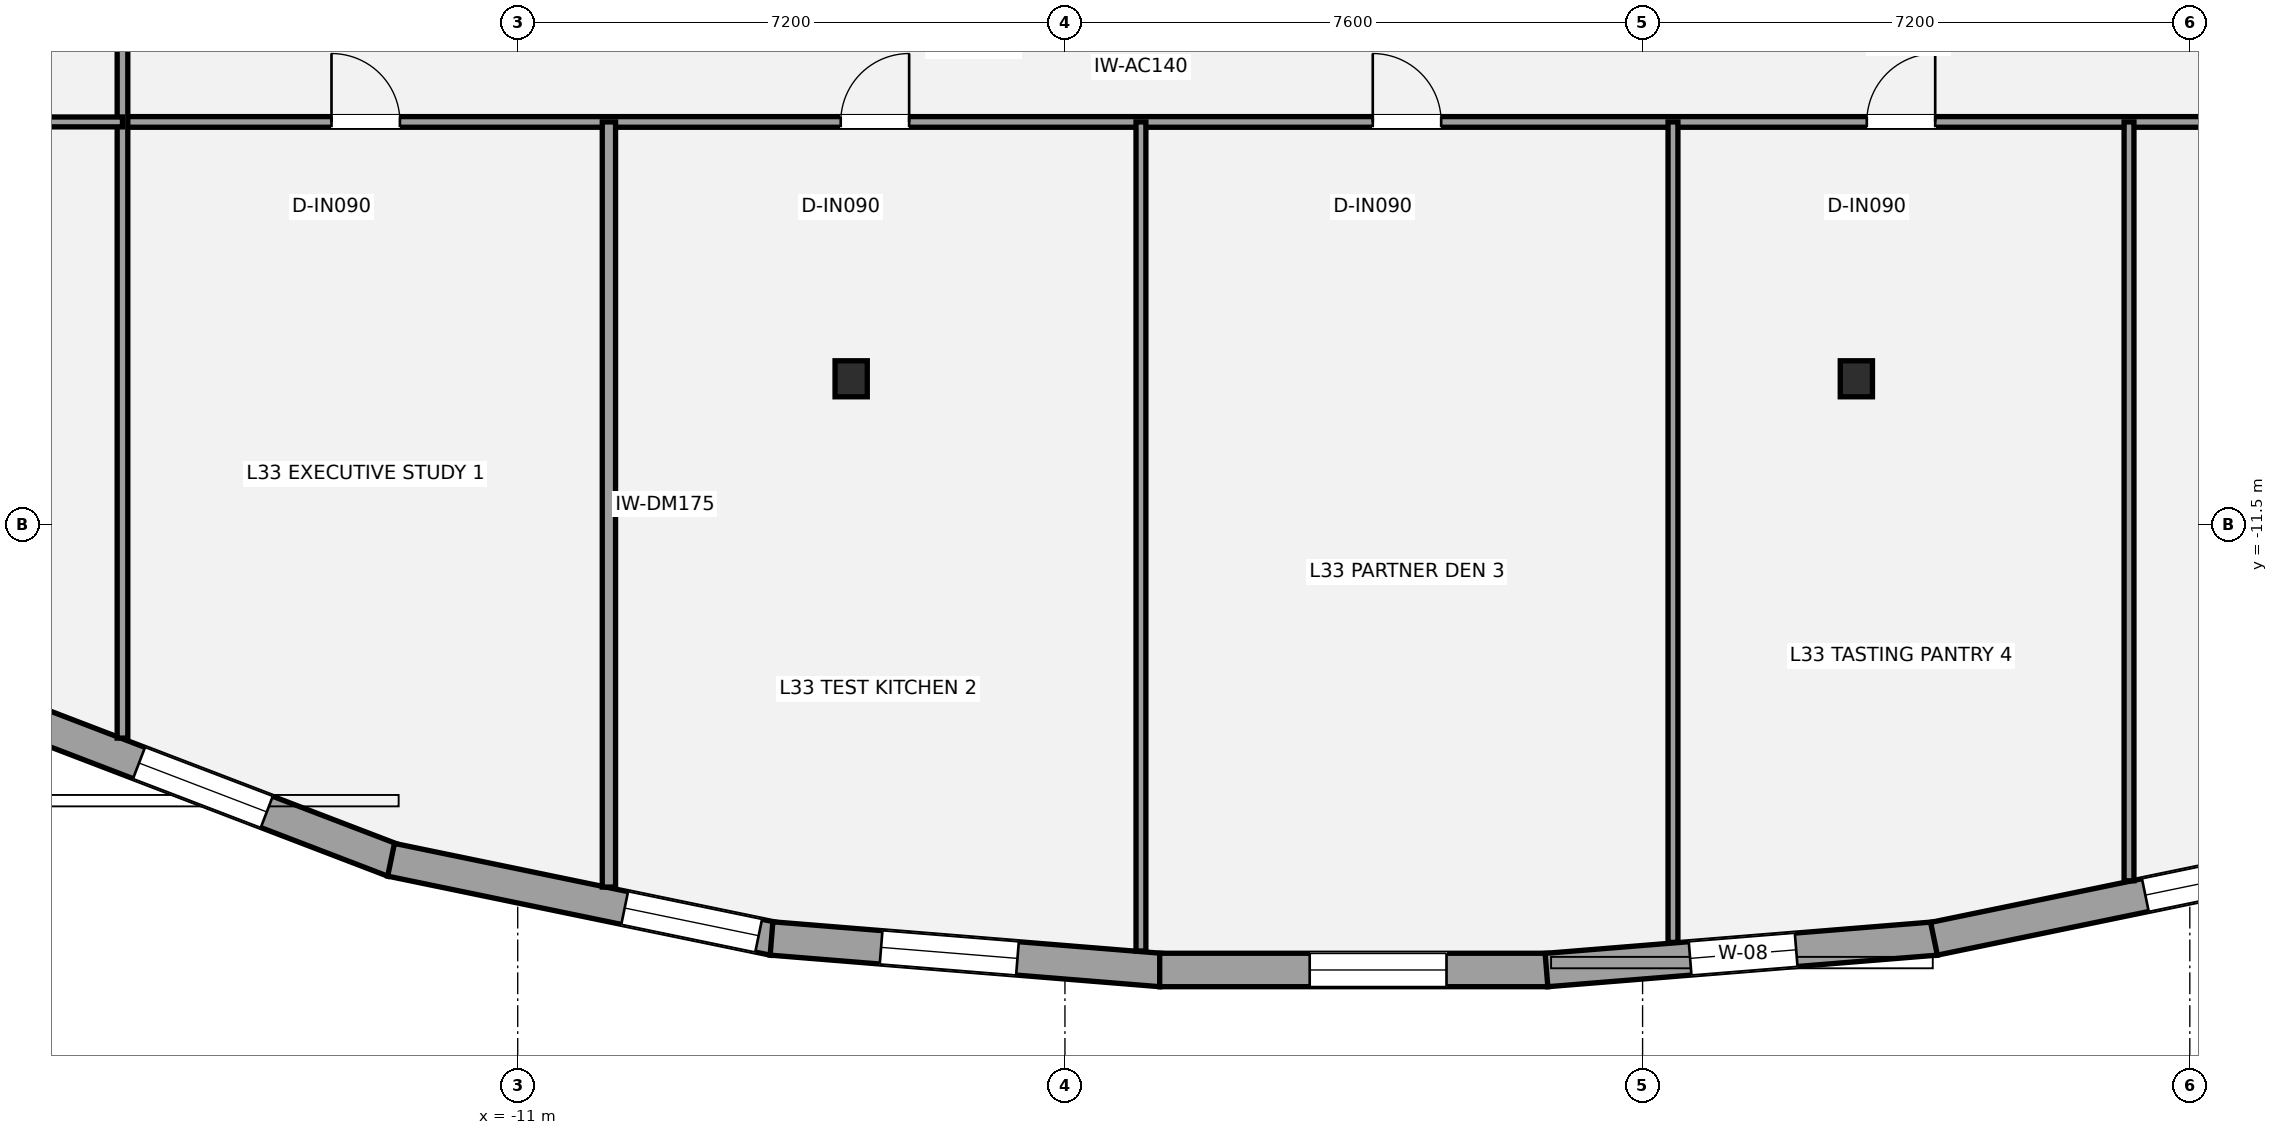
"""IFC4 building model, lengths in metres.
Left out: names, types, materials, properties, quantities, classifications, styles, units other than length and angle.
Written with IfcOpenShell. Run it as: python <this file> out.ifc"""

import sys

from ifc_helpers import new_model, si_unit, direction, frame, frame_2d, origin, origin_2d, place, context, subcontext, project, spatial, rectangle, i_section, extrude, element, fill, save


model = new_model("IFC4")
c1 = context("Model", 3, precision=1e-05, world=origin(), true_north=direction((0.0, 1.0)))
c2 = subcontext(c1, "Body", "Model", "MODEL_VIEW")
j1 = project(units=[si_unit("LENGTHUNIT", "METRE"), si_unit("PLANEANGLEUNIT", "RADIAN")], contexts=[c1])
p1 = place(None, origin())
s1 = spatial("IfcSite", under=j1, at=p1, CompositionType="ELEMENT")
p2 = place(p1, origin())
s2 = spatial("IfcBuilding", under=s1, at=p2, CompositionType="ELEMENT")
p3 = place(p2, frame((0.0, 0.0, 124.6)))
s3 = spatial("IfcBuildingStorey", under=s2, at=p3, CompositionType="ELEMENT", Elevation=124.6)
for number, where, z_axis, x_axis in (
    (1, (-6.613, -9.579, 0.0), (0.0, 0.0, 1.0), (1.0, 0.0, 0.0)),
    (2, (6.613, -9.579, 0.0), (0.0, 0.0, 1.0), (1.0, 0.0, 0.0)),
):
    element("IfcColumn", number, at=place(p3, frame(where, z_axis=z_axis, x_axis=x_axis)), inside=s3, PredefinedType="COLUMN", context=c2, shape_type="SweptSolid", body=[
        extrude(i_section(OverallWidth=0.424, OverallDepth=0.474, WebThickness=0.048, FlangeThickness=0.077, at=origin_2d()), origin(), (0.0, 0.0, 1.0), 3.5),
    ])
p4 = place(p3, frame((-17.237, -14.16, 0.0), z_axis=(0.0, 0.0, 1.0), x_axis=(-0.827672849676, 0.561210881852, 0.0)))
e3 = element("IfcWall", 3, at=p4, inside=s3, PredefinedType="STANDARD", context=c2, shape_type="SweptSolid", body=[
    extrude(rectangle(XDim=4.583, YDim=0.44, at=frame_2d((2.292, 0.0))), origin(), (0.0, 0.0, 1.0), 2.528),
])
p5 = place(p4, frame((0.945, 0.0, 0.65)))
e4 = element("IfcOpeningElement", 4, at=p5, cuts=e3, PredefinedType="OPENING", context=c2, shape_type="SweptSolid", body=[
    extrude(rectangle(XDim=1.8, YDim=1.7, at=frame_2d((0.9, 0.85))), frame((0.0, 0.23, 0.0), z_axis=(0.0, -1.0, 0.0), x_axis=(1.0, 0.0, 0.0)), (0.0, 0.0, 1.0), 0.46),
])
p6 = place(p3, frame((-12.632, -15.917, 0.0), z_axis=(0.0, 0.0, 1.0), x_axis=(-0.933853964101, 0.357654545243, 0.0)))
e5 = element("IfcWall", 5, at=p6, inside=s3, PredefinedType="STANDARD", context=c2, shape_type="SweptSolid", body=[
    extrude(rectangle(XDim=4.979, YDim=0.44, at=frame_2d((2.49, 0.0))), origin(), (0.0, 0.0, 1.0), 2.528),
])
p7 = place(p6, frame((1.788, 0.0, 0.48)))
e6 = element("IfcOpeningElement", 6, at=p7, cuts=e5, PredefinedType="OPENING", context=c2, shape_type="SweptSolid", body=[
    extrude(rectangle(XDim=1.8, YDim=1.7, at=frame_2d((0.9, 0.85))), frame((0.0, 0.23, 0.0), z_axis=(0.0, -1.0, 0.0), x_axis=(1.0, 0.0, 0.0)), (0.0, 0.0, 1.0), 0.46),
])
p8 = place(p3, frame((-7.634, -16.946, 0.0), z_axis=(0.0, 0.0, 1.0), x_axis=(-0.979339014215, 0.202225357552, 0.0)))
e7 = element("IfcWall", 7, at=p8, inside=s3, PredefinedType="STANDARD", context=c2, shape_type="SweptSolid", body=[
    extrude(rectangle(XDim=5.138, YDim=0.44, at=frame_2d((2.569, 0.0))), origin(), (0.0, 0.0, 1.0), 2.528),
])
p9 = place(p8, frame((0.2, 0.0, 0.65)))
e8 = element("IfcOpeningElement", 8, at=p9, cuts=e7, PredefinedType="OPENING", context=c2, shape_type="SweptSolid", body=[
    extrude(rectangle(XDim=1.8, YDim=1.7, at=frame_2d((0.9, 0.85))), frame((0.0, 0.23, 0.0), z_axis=(0.0, -1.0, 0.0), x_axis=(1.0, 0.0, 0.0)), (0.0, 0.0, 1.0), 0.46),
])
p10 = place(p3, frame((-2.536, -17.358, 0.0), z_axis=(0.0, 0.0, 1.0), x_axis=(-0.996733078328, 0.080766147401, 0.0)))
e9 = element("IfcWall", 9, at=p10, inside=s3, PredefinedType="STANDARD", context=c2, shape_type="SweptSolid", body=[
    extrude(rectangle(XDim=5.142, YDim=0.44, at=frame_2d((2.571, 0.0))), origin(), (0.0, 0.0, 1.0), 2.528),
])
p11 = place(p10, frame((1.895, 0.0, 0.65)))
e10 = element("IfcOpeningElement", 10, at=p11, cuts=e9, PredefinedType="OPENING", context=c2, shape_type="SweptSolid", body=[
    extrude(rectangle(XDim=1.8, YDim=1.7, at=frame_2d((0.9, 0.85))), frame((0.0, 0.23, 0.0), z_axis=(0.0, -1.0, 0.0), x_axis=(1.0, 0.0, 0.0)), (0.0, 0.0, 1.0), 0.46),
])
p12 = place(p3, frame((2.553, -17.357, 0.0), z_axis=(0.0, 0.0, 1.0), x_axis=(-1.0, 0.0, 0.0)))
e11 = element("IfcWall", 11, at=p12, inside=s3, PredefinedType="STANDARD", context=c2, shape_type="SweptSolid", body=[
    extrude(rectangle(XDim=5.107, YDim=0.44, at=frame_2d((2.553, 0.0))), origin(), (0.0, 0.0, 1.0), 2.528),
])
p13 = place(p12, frame((1.333, 0.0, 0.65)))
e12 = element("IfcOpeningElement", 12, at=p13, cuts=e11, PredefinedType="OPENING", context=c2, shape_type="SweptSolid", body=[
    extrude(rectangle(XDim=1.8, YDim=1.7, at=frame_2d((0.9, 0.85))), frame((0.0, 0.23, 0.0), z_axis=(0.0, -1.0, 0.0), x_axis=(1.0, 0.0, 0.0)), (0.0, 0.0, 1.0), 0.46),
])
p14 = place(p3, frame((7.661, -16.943, 0.0), z_axis=(0.0, 0.0, 1.0), x_axis=(-0.996733078328, -0.080766147401, 0.0)))
e13 = element("IfcWall", 13, at=p14, inside=s3, PredefinedType="STANDARD", context=c2, shape_type="SweptSolid", body=[
    extrude(rectangle(XDim=5.142, YDim=0.44, at=frame_2d((2.571, 0.0))), origin(), (0.0, 0.0, 1.0), 2.528),
])
p15 = place(p14, frame((1.846, 0.0, 0.45)))
e14 = element("IfcOpeningElement", 14, at=p15, cuts=e13, PredefinedType="OPENING", context=c2, shape_type="SweptSolid", body=[
    extrude(rectangle(XDim=1.4, YDim=1.55, at=frame_2d((0.7, 0.775))), frame((0.0, 0.23, 0.0), z_axis=(0.0, -1.0, 0.0), x_axis=(1.0, 0.0, 0.0)), (0.0, 0.0, 1.0), 0.46),
])
p16 = place(p3, frame((12.666, -15.907, 0.0), z_axis=(0.0, 0.0, 1.0), x_axis=(-0.979339014215, -0.202225357552, 0.0)))
e15 = element("IfcWall", 15, at=p16, inside=s3, PredefinedType="STANDARD", context=c2, shape_type="SweptSolid", body=[
    extrude(rectangle(XDim=5.138, YDim=0.44, at=frame_2d((2.569, 0.0))), origin(), (0.0, 0.0, 1.0), 2.528),
])
p17 = place(p16, frame((0.499, 0.0, 0.65)))
e16 = element("IfcOpeningElement", 16, at=p17, cuts=e15, PredefinedType="OPENING", context=c2, shape_type="SweptSolid", body=[
    extrude(rectangle(XDim=1.8, YDim=1.7, at=frame_2d((0.9, 0.85))), frame((0.0, 0.23, 0.0), z_axis=(0.0, -1.0, 0.0), x_axis=(1.0, 0.0, 0.0)), (0.0, 0.0, 1.0), 0.46),
])
p18 = place(p3, frame((-16.2, -6.2, 0.0), z_axis=(0.0, 0.0, 1.0), x_axis=(1.0, 0.0, 0.0)))
e17 = element("IfcWall", 17, at=p18, inside=s3, PredefinedType="PARTITIONING", context=c2, shape_type="SweptSolid", body=[
    extrude(rectangle(XDim=34.0, YDim=0.14, at=frame_2d((17.0, 0.0))), origin(), (0.0, 0.0, 1.0), 2.688),
])
p19 = place(p18, frame((2.75, 0.0, 0.0)))
e18 = element("IfcOpeningElement", 18, at=p19, cuts=e17, PredefinedType="OPENING", context=c2, shape_type="SweptSolid", body=[
    extrude(rectangle(XDim=0.9, YDim=2.1, at=frame_2d((0.45, 1.05))), frame((0.0, 0.08, 0.0), z_axis=(0.0, -1.0, 0.0), x_axis=(1.0, 0.0, 0.0)), (0.0, 0.0, 1.0), 0.16),
])
p20 = place(p18, frame((9.45, 0.0, 0.0)))
e19 = element("IfcOpeningElement", 19, at=p20, cuts=e17, PredefinedType="OPENING", context=c2, shape_type="SweptSolid", body=[
    extrude(rectangle(XDim=0.9, YDim=2.1, at=frame_2d((0.45, 1.05))), frame((0.0, 0.08, 0.0), z_axis=(0.0, -1.0, 0.0), x_axis=(1.0, 0.0, 0.0)), (0.0, 0.0, 1.0), 0.16),
])
p21 = place(p18, frame((16.45, 0.0, 0.0)))
e20 = element("IfcOpeningElement", 20, at=p21, cuts=e17, PredefinedType="OPENING", context=c2, shape_type="SweptSolid", body=[
    extrude(rectangle(XDim=0.9, YDim=2.1, at=frame_2d((0.45, 1.05))), frame((0.0, 0.08, 0.0), z_axis=(0.0, -1.0, 0.0), x_axis=(1.0, 0.0, 0.0)), (0.0, 0.0, 1.0), 0.16),
])
p22 = place(p18, frame((22.95, 0.0, 0.0)))
e21 = element("IfcOpeningElement", 21, at=p22, cuts=e17, PredefinedType="OPENING", context=c2, shape_type="SweptSolid", body=[
    extrude(rectangle(XDim=0.9, YDim=2.1, at=frame_2d((0.45, 1.05))), frame((0.0, 0.08, 0.0), z_axis=(0.0, -1.0, 0.0), x_axis=(1.0, 0.0, 0.0)), (0.0, 0.0, 1.0), 0.16),
])
p23 = place(p18, frame((29.45, 0.0, 0.0)))
e22 = element("IfcOpeningElement", 22, at=p23, cuts=e17, PredefinedType="OPENING", context=c2, shape_type="SweptSolid", body=[
    extrude(rectangle(XDim=1.5, YDim=2.15, at=frame_2d((0.75, 1.075))), frame((0.0, 0.08, 0.0), z_axis=(0.0, -1.0, 0.0), x_axis=(1.0, 0.0, 0.0)), (0.0, 0.0, 1.0), 0.16),
])
p24 = place(p3, frame((-16.2, -14.306, 0.0), z_axis=(0.0, 0.0, 1.0), x_axis=(0.0, 1.0, 0.0)))
e23 = element("IfcWall", 23, at=p24, inside=s3, PredefinedType="PARTITIONING", context=c2, shape_type="SweptSolid", body=[
    extrude(rectangle(XDim=21.856, YDim=0.14, at=frame_2d((10.928, 0.0))), origin(), (0.0, 0.0, 1.0), 2.763),
])
p25 = place(p24, frame((10.156, 0.0, 0.0)))
e24 = element("IfcOpeningElement", 24, at=p25, cuts=e23, PredefinedType="OPENING", context=c2, shape_type="SweptSolid", body=[
    extrude(rectangle(XDim=0.9, YDim=2.1, at=frame_2d((0.45, 1.05))), frame((0.0, 0.08, 0.0), z_axis=(0.0, -1.0, 0.0), x_axis=(1.0, 0.0, 0.0)), (0.0, 0.0, 1.0), 0.16),
])
p26 = place(p24, frame((14.956, 0.0, 0.0)))
e25 = element("IfcOpeningElement", 25, at=p26, cuts=e23, PredefinedType="OPENING", context=c2, shape_type="SweptSolid", body=[
    extrude(rectangle(XDim=0.9, YDim=2.1, at=frame_2d((0.45, 1.05))), frame((0.0, 0.08, 0.0), z_axis=(0.0, -1.0, 0.0), x_axis=(1.0, 0.0, 0.0)), (0.0, 0.0, 1.0), 0.16),
])
p27 = place(p24, frame((19.331, 0.0, 0.0)))
e26 = element("IfcOpeningElement", 26, at=p27, cuts=e23, PredefinedType="OPENING", context=c2, shape_type="SweptSolid", body=[
    extrude(rectangle(XDim=0.9, YDim=2.1, at=frame_2d((0.45, 1.05))), frame((0.0, 0.08, 0.0), z_axis=(0.0, -1.0, 0.0), x_axis=(1.0, 0.0, 0.0)), (0.0, 0.0, 1.0), 0.16),
])
p28 = place(p3, frame((-9.8, -16.266, 0.0), z_axis=(0.0, 0.0, 1.0), x_axis=(0.0, 1.0, 0.0)))
e27 = element("IfcWall", 27, at=p28, inside=s3, PredefinedType="PARTITIONING", context=c2, shape_type="SweptSolid", body=[
    extrude(rectangle(XDim=10.066, YDim=0.175, at=frame_2d((5.033, 0.0))), origin(), (0.0, 0.0, 1.0), 3.31),
])
p29 = place(p3, frame((-2.8, -17.108, 0.0), z_axis=(0.0, 0.0, 1.0), x_axis=(0.0, 1.0, 0.0)))
e28 = element("IfcWall", 28, at=p29, inside=s3, PredefinedType="PARTITIONING", context=c2, shape_type="SweptSolid", body=[
    extrude(rectangle(XDim=10.908, YDim=0.13, at=frame_2d((5.454, 0.0))), origin(), (0.0, 0.0, 1.0), 2.763),
])
p30 = place(p3, frame((4.2, -16.994, 0.0), z_axis=(0.0, 0.0, 1.0), x_axis=(0.0, 1.0, 0.0)))
e29 = element("IfcWall", 29, at=p30, inside=s3, PredefinedType="PARTITIONING", context=c2, shape_type="SweptSolid", body=[
    extrude(rectangle(XDim=10.794, YDim=0.13, at=frame_2d((5.397, 0.0))), origin(), (0.0, 0.0, 1.0), 2.763),
])
p31 = place(p3, frame((10.2, -16.184, 0.0), z_axis=(0.0, 0.0, 1.0), x_axis=(0.0, 1.0, 0.0)))
e30 = element("IfcWall", 30, at=p31, inside=s3, PredefinedType="PARTITIONING", context=c2, shape_type="SweptSolid", body=[
    extrude(rectangle(XDim=9.984, YDim=0.13, at=frame_2d((4.992, 0.0))), origin(), (0.0, 0.0, 1.0), 3.31),
])
p32 = place(p3, frame((-24.375, -6.2, 0.0), z_axis=(0.0, 0.0, 1.0), x_axis=(1.0, 0.0, 0.0)))
e31 = element("IfcWall", 31, at=p32, inside=s3, PredefinedType="PARTITIONING", context=c2, shape_type="SweptSolid", body=[
    extrude(rectangle(XDim=8.175, YDim=0.13, at=frame_2d((4.087, 0.0))), origin(), (0.0, 0.0, 1.0), 2.688),
])
p33 = place(p32, frame((1.11, 0.0, 0.0)))
e32 = element("IfcOpeningElement", 32, at=p33, cuts=e31, PredefinedType="OPENING", context=c2, shape_type="SweptSolid", body=[
    extrude(rectangle(XDim=0.9, YDim=2.1, at=frame_2d((0.45, 1.05))), frame((0.0, 0.075, 0.0), z_axis=(0.0, -1.0, 0.0), x_axis=(1.0, 0.0, 0.0)), (0.0, 0.0, 1.0), 0.15),
])
p34 = place(p7, origin())
e33 = element("IfcWindow", 33, at=p34, inside=s3, PartitioningType="SINGLE_PANEL", PredefinedType="WINDOW", context=c2, shape_type="SweptSolid", body=[
    extrude(rectangle(XDim=1.8, YDim=1.7, at=frame_2d((0.9, 0.85))), frame((0.0, -0.01, 0.0), z_axis=(0.0, -1.0, 0.0), x_axis=(1.0, 0.0, 0.0)), (0.0, 0.0, 1.0), 0.06),
])
fill(e6, e33)
p35 = place(p9, origin())
e34 = element("IfcWindow", 34, at=p35, inside=s3, PartitioningType="SINGLE_PANEL", PredefinedType="WINDOW", context=c2, shape_type="SweptSolid", body=[
    extrude(rectangle(XDim=1.8, YDim=1.7, at=frame_2d((0.9, 0.85))), frame((0.0, -0.01, 0.0), z_axis=(0.0, -1.0, 0.0), x_axis=(1.0, 0.0, 0.0)), (0.0, 0.0, 1.0), 0.06),
])
fill(e8, e34)
p36 = place(p11, origin())
e35 = element("IfcWindow", 35, at=p36, inside=s3, PartitioningType="SINGLE_PANEL", PredefinedType="WINDOW", context=c2, shape_type="SweptSolid", body=[
    extrude(rectangle(XDim=1.8, YDim=1.7, at=frame_2d((0.9, 0.85))), frame((0.0, -0.01, 0.0), z_axis=(0.0, -1.0, 0.0), x_axis=(1.0, 0.0, 0.0)), (0.0, 0.0, 1.0), 0.06),
])
fill(e10, e35)
p37 = place(p13, origin())
e36 = element("IfcWindow", 36, at=p37, inside=s3, PartitioningType="SINGLE_PANEL", PredefinedType="WINDOW", context=c2, shape_type="SweptSolid", body=[
    extrude(rectangle(XDim=1.8, YDim=1.7, at=frame_2d((0.9, 0.85))), frame((0.0, -0.01, 0.0), z_axis=(0.0, -1.0, 0.0), x_axis=(1.0, 0.0, 0.0)), (0.0, 0.0, 1.0), 0.06),
])
fill(e12, e36)
p38 = place(p15, origin())
e37 = element("IfcWindow", 37, at=p38, inside=s3, PartitioningType="SINGLE_PANEL", PredefinedType="WINDOW", context=c2, shape_type="SweptSolid", body=[
    extrude(rectangle(XDim=1.4, YDim=1.55, at=frame_2d((0.7, 0.775))), frame((0.0, -0.01, 0.0), z_axis=(0.0, -1.0, 0.0), x_axis=(1.0, 0.0, 0.0)), (0.0, 0.0, 1.0), 0.06),
])
fill(e14, e37)
p39 = place(p17, origin())
e38 = element("IfcWindow", 38, at=p39, inside=s3, PartitioningType="SINGLE_PANEL", PredefinedType="WINDOW", context=c2, shape_type="SweptSolid", body=[
    extrude(rectangle(XDim=1.8, YDim=1.7, at=frame_2d((0.9, 0.85))), frame((0.0, -0.01, 0.0), z_axis=(0.0, -1.0, 0.0), x_axis=(1.0, 0.0, 0.0)), (0.0, 0.0, 1.0), 0.06),
])
fill(e16, e38)
p40 = place(p19, origin())
e39 = element("IfcDoor", 39, at=p40, inside=s3, OperationType="SINGLE_SWING_LEFT", PredefinedType="DOOR", context=c2, shape_type="SweptSolid", body=[
    extrude(rectangle(XDim=0.9, YDim=2.1, at=frame_2d((0.45, 1.05))), frame((0.0, 0.025, 0.0), z_axis=(0.0, -1.0, 0.0), x_axis=(1.0, 0.0, 0.0)), (0.0, 0.0, 1.0), 0.05),
])
fill(e18, e39)
p41 = place(p20, origin())
e40 = element("IfcDoor", 40, at=p41, inside=s3, OperationType="SINGLE_SWING_RIGHT", PredefinedType="DOOR", context=c2, shape_type="SweptSolid", body=[
    extrude(rectangle(XDim=0.9, YDim=2.1, at=frame_2d((0.45, 1.05))), frame((0.0, 0.025, 0.0), z_axis=(0.0, -1.0, 0.0), x_axis=(1.0, 0.0, 0.0)), (0.0, 0.0, 1.0), 0.05),
])
fill(e19, e40)
p42 = place(p21, origin())
e41 = element("IfcDoor", 41, at=p42, inside=s3, OperationType="SINGLE_SWING_LEFT", PredefinedType="DOOR", context=c2, shape_type="SweptSolid", body=[
    extrude(rectangle(XDim=0.9, YDim=2.1, at=frame_2d((0.45, 1.05))), frame((0.0, 0.025, 0.0), z_axis=(0.0, -1.0, 0.0), x_axis=(1.0, 0.0, 0.0)), (0.0, 0.0, 1.0), 0.05),
])
fill(e20, e41)
p43 = place(p22, origin())
e42 = element("IfcDoor", 42, at=p43, inside=s3, OperationType="SINGLE_SWING_RIGHT", PredefinedType="DOOR", context=c2, shape_type="SweptSolid", body=[
    extrude(rectangle(XDim=0.9, YDim=2.1, at=frame_2d((0.45, 1.05))), frame((0.0, 0.025, 0.0), z_axis=(0.0, -1.0, 0.0), x_axis=(1.0, 0.0, 0.0)), (0.0, 0.0, 1.0), 0.05),
])
fill(e21, e42)
save(model, sys.argv[1])
